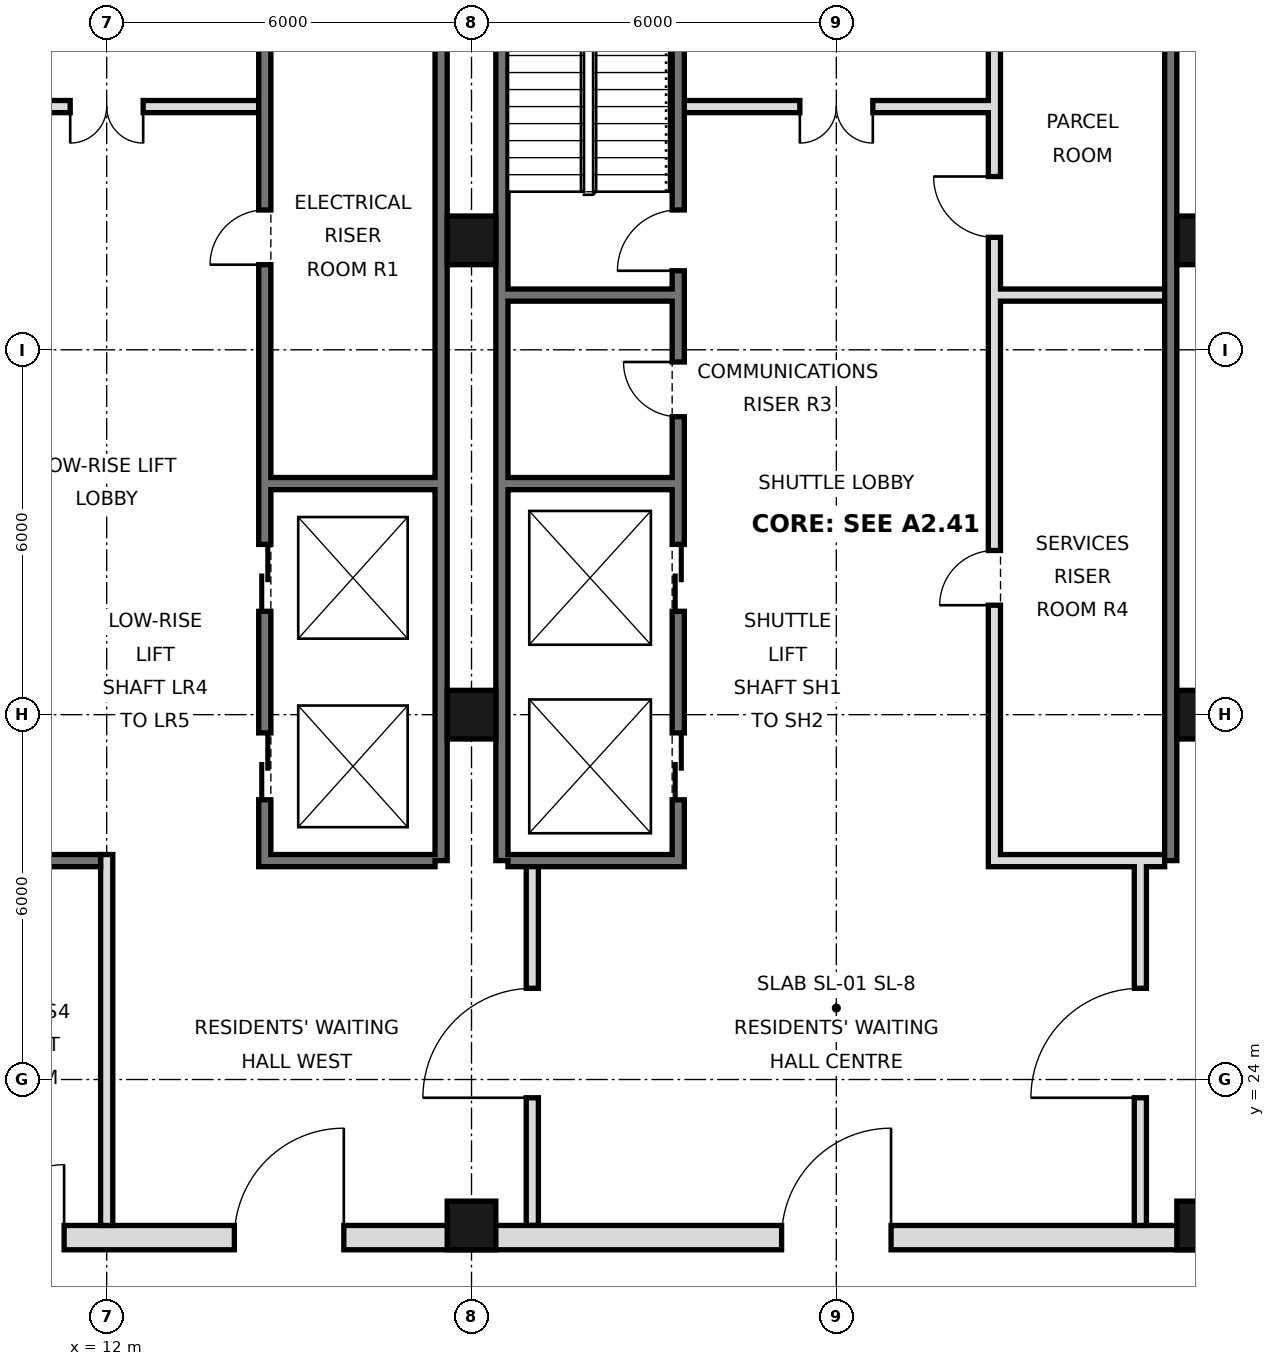
"""IFC4 building model, lengths in metres.
Left out: names, types, materials, properties, quantities, classifications, styles, units other than length and angle.
Written with IfcOpenShell. Run it as: python <this file> out.ifc"""

import sys

from ifc_helpers import new_model, si_unit, direction, frame, frame_2d, origin, origin_2d, place, context, subcontext, project, spatial, rectangle, hollow_rectangle, extrude, element, fill, save


model = new_model("IFC4")
c1 = context("Model", 3, precision=1e-05, world=origin(), true_north=direction((0.0, 1.0)))
c2 = subcontext(c1, "Body", "Model", "MODEL_VIEW")
j1 = project(units=[si_unit("LENGTHUNIT", "METRE"), si_unit("PLANEANGLEUNIT", "RADIAN")], contexts=[c1])
p1 = place(None, origin())
s1 = spatial("IfcSite", under=j1, at=p1, CompositionType="ELEMENT")
p2 = place(p1, origin())
s2 = spatial("IfcBuilding", under=s1, at=p2, CompositionType="ELEMENT")
p3 = place(p2, frame((0.0, 0.0, 161.8)))
s3 = spatial("IfcBuildingStorey", under=s2, at=p3, CompositionType="ELEMENT", Elevation=161.8)
for number, where, z_axis, x_axis in (
    (1, (18.0, 21.6, 0.0), (0.0, 0.0, 1.0), (1.0, 0.0, 0.0)),
    (2, (18.0, 30.0, 0.0), (0.0, 0.0, 1.0), (1.0, 0.0, 0.0)),
    (3, (18.0, 37.8, 0.0), (0.0, 0.0, 1.0), (1.0, 0.0, 0.0)),
    (4, (30.0, 21.6, 0.0), (0.0, 0.0, 1.0), (1.0, 0.0, 0.0)),
    (5, (30.0, 30.0, 0.0), (0.0, 0.0, 1.0), (1.0, 0.0, 0.0)),
    (6, (30.0, 37.8, 0.0), (0.0, 0.0, 1.0), (1.0, 0.0, 0.0)),
):
    element("IfcColumn", number, at=place(p3, frame(where, z_axis=z_axis, x_axis=x_axis)), inside=s3, PredefinedType="COLUMN", context=c2, shape_type="SweptSolid", body=[
        extrude(hollow_rectangle(XDim=0.8, YDim=0.8, WallThickness=0.045, at=origin_2d()), origin(), (0.0, 0.0, 1.0), 5.4),
    ])
for number, where, z_axis, x_axis in (
    (7, (17.5, 27.6, 0.0), (0.0, 0.0, 1.0), (0.0, 1.0, 0.0)),
    (8, (18.5, 27.6, 0.0), (0.0, 0.0, 1.0), (0.0, 1.0, 0.0)),
    (9, (29.5, 27.6, 0.0), (0.0, 0.0, 1.0), (0.0, 1.0, 0.0)),
):
    element("IfcWall", number, at=place(p3, frame(where, z_axis=z_axis, x_axis=x_axis)), inside=s3, PredefinedType="SOLIDWALL", context=c2, shape_type="SweptSolid", body=[
        extrude(rectangle(XDim=17.5, YDim=0.2, at=frame_2d((8.75, 0.0))), origin(), (0.0, 0.0, 1.0), 5.22),
    ])
p4 = place(p3, frame((5.6, 21.4, 0.0), z_axis=(0.0, 0.0, 1.0), x_axis=(1.0, 0.0, 0.0)))
e10 = element("IfcWall", 10, at=p4, inside=s3, PredefinedType="SOLIDWALL", context=c2, shape_type="SweptSolid", body=[
    extrude(rectangle(XDim=36.8, YDim=0.4, at=frame_2d((18.4, 0.0))), origin(), (0.0, 0.0, 1.0), 5.22),
])
p5 = place(p4, frame((8.5, 0.0, 0.0)))
e11 = element("IfcOpeningElement", 11, at=p5, cuts=e10, PredefinedType="OPENING", context=c2, shape_type="SweptSolid", body=[
    extrude(rectangle(XDim=1.8, YDim=2.1, at=frame_2d((0.9, 1.05))), frame((0.0, 0.21, 0.0), z_axis=(0.0, -1.0, 0.0), x_axis=(1.0, 0.0, 0.0)), (0.0, 0.0, 1.0), 0.42),
])
p6 = place(p4, frame((17.5, 0.0, 0.0)))
e12 = element("IfcOpeningElement", 12, at=p6, cuts=e10, PredefinedType="OPENING", context=c2, shape_type="SweptSolid", body=[
    extrude(rectangle(XDim=1.8, YDim=2.1, at=frame_2d((0.9, 1.05))), frame((0.0, 0.21, 0.0), z_axis=(0.0, -1.0, 0.0), x_axis=(1.0, 0.0, 0.0)), (0.0, 0.0, 1.0), 0.42),
])
p7 = place(p4, frame((26.5, 0.0, 0.0)))
e13 = element("IfcOpeningElement", 13, at=p7, cuts=e10, PredefinedType="OPENING", context=c2, shape_type="SweptSolid", body=[
    extrude(rectangle(XDim=1.8, YDim=2.1, at=frame_2d((0.9, 1.05))), frame((0.0, 0.21, 0.0), z_axis=(0.0, -1.0, 0.0), x_axis=(1.0, 0.0, 0.0)), (0.0, 0.0, 1.0), 0.42),
])
p8 = place(p4, frame((4.5, 0.0, 0.0)))
e14 = element("IfcOpeningElement", 14, at=p8, cuts=e10, PredefinedType="OPENING", context=c2, shape_type="SweptSolid", body=[
    extrude(rectangle(XDim=1.2, YDim=2.1, at=frame_2d((0.6, 1.05))), frame((0.0, 0.21, 0.0), z_axis=(0.0, -1.0, 0.0), x_axis=(1.0, 0.0, 0.0)), (0.0, 0.0, 1.0), 0.42),
])
p9 = place(p4, frame((31.1, 0.0, 0.0)))
e15 = element("IfcOpeningElement", 15, at=p9, cuts=e10, PredefinedType="OPENING", context=c2, shape_type="SweptSolid", body=[
    extrude(rectangle(XDim=1.2, YDim=2.1, at=frame_2d((0.6, 1.05))), frame((0.0, 0.21, 0.0), z_axis=(0.0, -1.0, 0.0), x_axis=(1.0, 0.0, 0.0)), (0.0, 0.0, 1.0), 0.42),
])
p10 = place(p3, frame((19.0, 21.6, 0.0), z_axis=(0.0, 0.0, 1.0), x_axis=(0.0, 1.0, 0.0)))
e16 = element("IfcWall", 16, at=p10, inside=s3, PredefinedType="PARTITIONING", context=c2, shape_type="SweptSolid", body=[
    extrude(rectangle(XDim=6.0, YDim=0.2, at=frame_2d((3.0, 0.0))), origin(), (0.0, 0.0, 1.0), 5.22),
])
p11 = place(p10, frame((2.1, 0.0, 0.0)))
e17 = element("IfcOpeningElement", 17, at=p11, cuts=e16, PredefinedType="OPENING", context=c2, shape_type="SweptSolid", body=[
    extrude(rectangle(XDim=1.8, YDim=2.1, at=frame_2d((0.9, 1.05))), frame((0.0, 0.11, 0.0), z_axis=(0.0, -1.0, 0.0), x_axis=(1.0, 0.0, 0.0)), (0.0, 0.0, 1.0), 0.22),
])
p12 = place(p3, frame((29.0, 21.6, 0.0), z_axis=(0.0, 0.0, 1.0), x_axis=(0.0, 1.0, 0.0)))
e18 = element("IfcWall", 18, at=p12, inside=s3, PredefinedType="PARTITIONING", context=c2, shape_type="SweptSolid", body=[
    extrude(rectangle(XDim=6.0, YDim=0.2, at=frame_2d((3.0, 0.0))), origin(), (0.0, 0.0, 1.0), 5.22),
])
p13 = place(p12, frame((2.1, 0.0, 0.0)))
e19 = element("IfcOpeningElement", 19, at=p13, cuts=e18, PredefinedType="OPENING", context=c2, shape_type="SweptSolid", body=[
    extrude(rectangle(XDim=1.8, YDim=2.1, at=frame_2d((0.9, 1.05))), frame((0.0, 0.11, 0.0), z_axis=(0.0, -1.0, 0.0), x_axis=(1.0, 0.0, 0.0)), (0.0, 0.0, 1.0), 0.22),
])
p14 = place(p3, frame((12.0, 21.6, 0.0), z_axis=(0.0, 0.0, 1.0), x_axis=(0.0, 1.0, 0.0)))
e20 = element("IfcWall", 20, at=p14, inside=s3, PredefinedType="PARTITIONING", context=c2, shape_type="SweptSolid", body=[
    extrude(rectangle(XDim=6.1, YDim=0.2, at=frame_2d((3.05, 0.0))), origin(), (0.0, 0.0, 1.0), 5.22),
])
p15 = place(p3, frame((14.6, 27.5, 0.0), z_axis=(0.0, 0.0, 1.0), x_axis=(0.0, 1.0, 0.0)))
e21 = element("IfcWall", 21, at=p15, inside=s3, PredefinedType="SOLIDWALL", context=c2, shape_type="SweptSolid", body=[
    extrude(rectangle(XDim=17.5, YDim=0.2, at=frame_2d((8.75, 0.0))), origin(), (0.0, 0.0, 1.0), 5.22),
])
p16 = place(p15, frame((1.1, 0.0, 0.0)))
e22 = element("IfcOpeningElement", 22, at=p16, cuts=e21, PredefinedType="OPENING", context=c2, shape_type="SweptSolid", body=[
    extrude(rectangle(XDim=1.1, YDim=2.1, at=frame_2d((0.55, 1.05))), frame((0.0, 0.11, 0.0), z_axis=(0.0, -1.0, 0.0), x_axis=(1.0, 0.0, 0.0)), (0.0, 0.0, 1.0), 0.22),
])
p17 = place(p15, frame((4.2, 0.0, 0.0)))
e23 = element("IfcOpeningElement", 23, at=p17, cuts=e21, PredefinedType="OPENING", context=c2, shape_type="SweptSolid", body=[
    extrude(rectangle(XDim=1.1, YDim=2.1, at=frame_2d((0.55, 1.05))), frame((0.0, 0.11, 0.0), z_axis=(0.0, -1.0, 0.0), x_axis=(1.0, 0.0, 0.0)), (0.0, 0.0, 1.0), 0.22),
])
p18 = place(p15, frame((15.4, 0.0, 0.0)))
e24 = element("IfcOpeningElement", 24, at=p18, cuts=e21, PredefinedType="OPENING", context=c2, shape_type="SweptSolid", body=[
    extrude(rectangle(XDim=1.1, YDim=2.1, at=frame_2d((0.55, 1.05))), frame((0.0, 0.11, 0.0), z_axis=(0.0, -1.0, 0.0), x_axis=(1.0, 0.0, 0.0)), (0.0, 0.0, 1.0), 0.22),
])
p19 = place(p15, frame((9.9, 0.0, 0.0)))
e25 = element("IfcOpeningElement", 25, at=p19, cuts=e21, PredefinedType="OPENING", context=c2, shape_type="SweptSolid", body=[
    extrude(rectangle(XDim=0.9, YDim=2.1, at=frame_2d((0.45, 1.05))), frame((0.0, 0.11, 0.0), z_axis=(0.0, -1.0, 0.0), x_axis=(1.0, 0.0, 0.0)), (0.0, 0.0, 1.0), 0.22),
])
p20 = place(p3, frame((21.4, 27.5, 0.0), z_axis=(0.0, 0.0, 1.0), x_axis=(0.0, 1.0, 0.0)))
e26 = element("IfcWall", 26, at=p20, inside=s3, PredefinedType="SOLIDWALL", context=c2, shape_type="SweptSolid", body=[
    extrude(rectangle(XDim=17.5, YDim=0.2, at=frame_2d((8.75, 0.0))), origin(), (0.0, 0.0, 1.0), 5.22),
])
p21 = place(p20, frame((1.1, 0.0, 0.0)))
e27 = element("IfcOpeningElement", 27, at=p21, cuts=e26, PredefinedType="OPENING", context=c2, shape_type="SweptSolid", body=[
    extrude(rectangle(XDim=1.1, YDim=2.1, at=frame_2d((0.55, 1.05))), frame((0.0, 0.11, 0.0), z_axis=(0.0, -1.0, 0.0), x_axis=(1.0, 0.0, 0.0)), (0.0, 0.0, 1.0), 0.22),
])
p22 = place(p20, frame((4.2, 0.0, 0.0)))
e28 = element("IfcOpeningElement", 28, at=p22, cuts=e26, PredefinedType="OPENING", context=c2, shape_type="SweptSolid", body=[
    extrude(rectangle(XDim=1.1, YDim=2.1, at=frame_2d((0.55, 1.05))), frame((0.0, 0.11, 0.0), z_axis=(0.0, -1.0, 0.0), x_axis=(1.0, 0.0, 0.0)), (0.0, 0.0, 1.0), 0.22),
])
p23 = place(p20, frame((9.8, 0.0, 0.0)))
e29 = element("IfcOpeningElement", 29, at=p23, cuts=e26, PredefinedType="OPENING", context=c2, shape_type="SweptSolid", body=[
    extrude(rectangle(XDim=1.0, YDim=2.1, at=frame_2d((0.5, 1.05))), frame((0.0, 0.11, 0.0), z_axis=(0.0, -1.0, 0.0), x_axis=(1.0, 0.0, 0.0)), (0.0, 0.0, 1.0), 0.22),
])
p24 = place(p20, frame((7.4, 0.0, 0.0)))
e30 = element("IfcOpeningElement", 30, at=p24, cuts=e26, PredefinedType="OPENING", context=c2, shape_type="SweptSolid", body=[
    extrude(rectangle(XDim=0.9, YDim=2.1, at=frame_2d((0.45, 1.05))), frame((0.0, 0.11, 0.0), z_axis=(0.0, -1.0, 0.0), x_axis=(1.0, 0.0, 0.0)), (0.0, 0.0, 1.0), 0.22),
])
p25 = place(p3, frame((26.6, 27.5, 0.0), z_axis=(0.0, 0.0, 1.0), x_axis=(0.0, 1.0, 0.0)))
e31 = element("IfcWall", 31, at=p25, inside=s3, PredefinedType="SOLIDWALL", context=c2, shape_type="SweptSolid", body=[
    extrude(rectangle(XDim=17.5, YDim=0.2, at=frame_2d((8.75, 0.0))), origin(), (0.0, 0.0, 1.0), 5.22),
])
p26 = place(p25, frame((4.3, 0.0, 0.0)))
e32 = element("IfcOpeningElement", 32, at=p26, cuts=e31, PredefinedType="OPENING", context=c2, shape_type="SweptSolid", body=[
    extrude(rectangle(XDim=0.9, YDim=2.1, at=frame_2d((0.45, 1.05))), frame((0.0, 0.11, 0.0), z_axis=(0.0, -1.0, 0.0), x_axis=(1.0, 0.0, 0.0)), (0.0, 0.0, 1.0), 0.22),
])
p27 = place(p25, frame((10.35, 0.0, 0.0)))
e33 = element("IfcOpeningElement", 33, at=p27, cuts=e31, PredefinedType="OPENING", context=c2, shape_type="SweptSolid", body=[
    extrude(rectangle(XDim=1.0, YDim=2.1, at=frame_2d((0.5, 1.05))), frame((0.0, 0.11, 0.0), z_axis=(0.0, -1.0, 0.0), x_axis=(1.0, 0.0, 0.0)), (0.0, 0.0, 1.0), 0.22),
])
p28 = place(p25, frame((15.475, 0.0, 0.0)))
e34 = element("IfcOpeningElement", 34, at=p28, cuts=e31, PredefinedType="OPENING", context=c2, shape_type="SweptSolid", body=[
    extrude(rectangle(XDim=1.0, YDim=2.1, at=frame_2d((0.5, 1.05))), frame((0.0, 0.11, 0.0), z_axis=(0.0, -1.0, 0.0), x_axis=(1.0, 0.0, 0.0)), (0.0, 0.0, 1.0), 0.22),
])
for number, where, z_axis, x_axis in (
    (35, (14.7, 27.6, 0.0), (0.0, 0.0, 1.0), (1.0, 0.0, 0.0)),
    (36, (18.6, 27.6, 0.0), (0.0, 0.0, 1.0), (1.0, 0.0, 0.0)),
    (37, (26.7, 27.6, 0.0), (0.0, 0.0, 1.0), (1.0, 0.0, 0.0)),
):
    element("IfcWall", number, at=place(p3, frame(where, z_axis=z_axis, x_axis=x_axis)), inside=s3, PredefinedType="SOLIDWALL", context=c2, shape_type="SweptSolid", body=[
        extrude(rectangle(XDim=2.7, YDim=0.2, at=frame_2d((1.35, 0.0))), origin(), (0.0, 0.0, 1.0), 5.22),
    ])
p29 = place(p3, frame((6.6, 27.6, 0.0), z_axis=(0.0, 0.0, 1.0), x_axis=(1.0, 0.0, 0.0)))
e38 = element("IfcWall", 38, at=p29, inside=s3, PredefinedType="SOLIDWALL", context=c2, shape_type="SweptSolid", body=[
    extrude(rectangle(XDim=5.3, YDim=0.2, at=frame_2d((2.65, 0.0))), origin(), (0.0, 0.0, 1.0), 5.22),
])
for number, where, z_axis, x_axis in (
    (39, (14.7, 33.8, 0.0), (0.0, 0.0, 1.0), (1.0, 0.0, 0.0)),
    (40, (18.6, 33.8, 0.0), (0.0, 0.0, 1.0), (1.0, 0.0, 0.0)),
    (41, (18.6, 36.9, 0.0), (0.0, 0.0, 1.0), (1.0, 0.0, 0.0)),
    (42, (26.7, 36.9, 0.0), (0.0, 0.0, 1.0), (1.0, 0.0, 0.0)),
):
    element("IfcWall", number, at=place(p3, frame(where, z_axis=z_axis, x_axis=x_axis)), inside=s3, PredefinedType="SOLIDWALL", context=c2, shape_type="SweptSolid", body=[
        extrude(rectangle(XDim=2.7, YDim=0.2, at=frame_2d((1.35, 0.0))), origin(), (0.0, 0.0, 1.0), 5.22),
    ])
p30 = place(p3, frame((21.5, 40.0, 0.0), z_axis=(0.0, 0.0, 1.0), x_axis=(1.0, 0.0, 0.0)))
e43 = element("IfcWall", 43, at=p30, inside=s3, PredefinedType="PARTITIONING", context=c2, shape_type="SweptSolid", body=[
    extrude(rectangle(XDim=5.0, YDim=0.2, at=frame_2d((2.5, 0.0))), origin(), (0.0, 0.0, 1.0), 5.22),
])
p31 = place(p30, frame((1.9, 0.0, 0.0)))
e44 = element("IfcOpeningElement", 44, at=p31, cuts=e43, PredefinedType="OPENING", context=c2, shape_type="SweptSolid", body=[
    extrude(rectangle(XDim=1.2, YDim=2.1, at=frame_2d((0.6, 1.05))), frame((0.0, 0.11, 0.0), z_axis=(0.0, -1.0, 0.0), x_axis=(1.0, 0.0, 0.0)), (0.0, 0.0, 1.0), 0.22),
])
p32 = place(p3, frame((9.5, 40.0, 0.0), z_axis=(0.0, 0.0, 1.0), x_axis=(1.0, 0.0, 0.0)))
e45 = element("IfcWall", 45, at=p32, inside=s3, PredefinedType="PARTITIONING", context=c2, shape_type="SweptSolid", body=[
    extrude(rectangle(XDim=5.0, YDim=0.2, at=frame_2d((2.5, 0.0))), origin(), (0.0, 0.0, 1.0), 5.22),
])
p33 = place(p32, frame((1.9, 0.0, 0.0)))
e46 = element("IfcOpeningElement", 46, at=p33, cuts=e45, PredefinedType="OPENING", context=c2, shape_type="SweptSolid", body=[
    extrude(rectangle(XDim=1.2, YDim=2.1, at=frame_2d((0.6, 1.05))), frame((0.0, 0.11, 0.0), z_axis=(0.0, -1.0, 0.0), x_axis=(1.0, 0.0, 0.0)), (0.0, 0.0, 1.0), 0.22),
])
p34 = place(p5, frame((1.8, 0.0, 0.0), z_axis=(0.0, 0.0, 1.0), x_axis=(-1.0, 0.0, 0.0)))
e47 = element("IfcDoor", 47, at=p34, inside=s3, OperationType="SINGLE_SWING_LEFT", PredefinedType="DOOR", context=c2, shape_type="SweptSolid", body=[
    extrude(rectangle(XDim=1.8, YDim=2.1, at=frame_2d((0.9, 1.05))), frame((0.0, 0.025, 0.0), z_axis=(0.0, -1.0, 0.0), x_axis=(1.0, 0.0, 0.0)), (0.0, 0.0, 1.0), 0.05),
])
fill(e11, e47)
p35 = place(p11, origin())
e48 = element("IfcDoor", 48, at=p35, inside=s3, OperationType="SINGLE_SWING_LEFT", PredefinedType="DOOR", context=c2, shape_type="SweptSolid", body=[
    extrude(rectangle(XDim=1.8, YDim=2.1, at=frame_2d((0.9, 1.05))), frame((0.0, 0.025, 0.0), z_axis=(0.0, -1.0, 0.0), x_axis=(1.0, 0.0, 0.0)), (0.0, 0.0, 1.0), 0.05),
])
fill(e17, e48)
p36 = place(p6, frame((1.8, 0.0, 0.0), z_axis=(0.0, 0.0, 1.0), x_axis=(-1.0, 0.0, 0.0)))
e49 = element("IfcDoor", 49, at=p36, inside=s3, OperationType="SINGLE_SWING_LEFT", PredefinedType="DOOR", context=c2, shape_type="SweptSolid", body=[
    extrude(rectangle(XDim=1.8, YDim=2.1, at=frame_2d((0.9, 1.05))), frame((0.0, 0.025, 0.0), z_axis=(0.0, -1.0, 0.0), x_axis=(1.0, 0.0, 0.0)), (0.0, 0.0, 1.0), 0.05),
])
fill(e12, e49)
p37 = place(p13, origin())
e50 = element("IfcDoor", 50, at=p37, inside=s3, OperationType="SINGLE_SWING_LEFT", PredefinedType="DOOR", context=c2, shape_type="SweptSolid", body=[
    extrude(rectangle(XDim=1.8, YDim=2.1, at=frame_2d((0.9, 1.05))), frame((0.0, 0.025, 0.0), z_axis=(0.0, -1.0, 0.0), x_axis=(1.0, 0.0, 0.0)), (0.0, 0.0, 1.0), 0.05),
])
fill(e19, e50)
p38 = place(p8, frame((1.2, 0.0, 0.0), z_axis=(0.0, 0.0, 1.0), x_axis=(-1.0, 0.0, 0.0)))
e51 = element("IfcDoor", 51, at=p38, inside=s3, OperationType="SINGLE_SWING_LEFT", PredefinedType="DOOR", context=c2, shape_type="SweptSolid", body=[
    extrude(rectangle(XDim=1.2, YDim=2.1, at=frame_2d((0.6, 1.05))), frame((0.0, 0.025, 0.0), z_axis=(0.0, -1.0, 0.0), x_axis=(1.0, 0.0, 0.0)), (0.0, 0.0, 1.0), 0.05),
])
fill(e14, e51)
p39 = place(p33, frame((1.2, 0.0, 0.0), z_axis=(0.0, 0.0, 1.0), x_axis=(-1.0, 0.0, 0.0)))
e52 = element("IfcDoor", 52, at=p39, inside=s3, OperationType="DOUBLE_DOOR_SINGLE_SWING", PredefinedType="DOOR", context=c2, shape_type="SweptSolid", body=[
    extrude(rectangle(XDim=1.2, YDim=2.1, at=frame_2d((0.6, 1.05))), frame((0.0, 0.025, 0.0), z_axis=(0.0, -1.0, 0.0), x_axis=(1.0, 0.0, 0.0)), (0.0, 0.0, 1.0), 0.05),
])
fill(e46, e52)
p40 = place(p31, frame((1.2, 0.0, 0.0), z_axis=(0.0, 0.0, 1.0), x_axis=(-1.0, 0.0, 0.0)))
e53 = element("IfcDoor", 53, at=p40, inside=s3, OperationType="DOUBLE_DOOR_SINGLE_SWING", PredefinedType="DOOR", context=c2, shape_type="SweptSolid", body=[
    extrude(rectangle(XDim=1.2, YDim=2.1, at=frame_2d((0.6, 1.05))), frame((0.0, 0.025, 0.0), z_axis=(0.0, -1.0, 0.0), x_axis=(1.0, 0.0, 0.0)), (0.0, 0.0, 1.0), 0.05),
])
fill(e44, e53)
p41 = place(p21, origin())
e54 = element("IfcDoor", 54, at=p41, inside=s3, OperationType="DOUBLE_DOOR_SLIDING", PredefinedType="DOOR", context=c2, shape_type="SweptSolid", body=[
    extrude(rectangle(XDim=1.1, YDim=2.1, at=frame_2d((0.55, 1.05))), frame((0.0, 0.025, 0.0), z_axis=(0.0, -1.0, 0.0), x_axis=(1.0, 0.0, 0.0)), (0.0, 0.0, 1.0), 0.05),
])
fill(e27, e54)
p42 = place(p22, origin())
e55 = element("IfcDoor", 55, at=p42, inside=s3, OperationType="DOUBLE_DOOR_SLIDING", PredefinedType="DOOR", context=c2, shape_type="SweptSolid", body=[
    extrude(rectangle(XDim=1.1, YDim=2.1, at=frame_2d((0.55, 1.05))), frame((0.0, 0.025, 0.0), z_axis=(0.0, -1.0, 0.0), x_axis=(1.0, 0.0, 0.0)), (0.0, 0.0, 1.0), 0.05),
])
fill(e28, e55)
p43 = place(p16, origin())
e56 = element("IfcDoor", 56, at=p43, inside=s3, OperationType="DOUBLE_DOOR_SLIDING", PredefinedType="DOOR", context=c2, shape_type="SweptSolid", body=[
    extrude(rectangle(XDim=1.1, YDim=2.1, at=frame_2d((0.55, 1.05))), frame((0.0, 0.025, 0.0), z_axis=(0.0, -1.0, 0.0), x_axis=(1.0, 0.0, 0.0)), (0.0, 0.0, 1.0), 0.05),
])
fill(e22, e56)
p44 = place(p17, origin())
e57 = element("IfcDoor", 57, at=p44, inside=s3, OperationType="DOUBLE_DOOR_SLIDING", PredefinedType="DOOR", context=c2, shape_type="SweptSolid", body=[
    extrude(rectangle(XDim=1.1, YDim=2.1, at=frame_2d((0.55, 1.05))), frame((0.0, 0.025, 0.0), z_axis=(0.0, -1.0, 0.0), x_axis=(1.0, 0.0, 0.0)), (0.0, 0.0, 1.0), 0.05),
])
fill(e23, e57)
p45 = place(p23, origin())
e58 = element("IfcDoor", 58, at=p45, inside=s3, OperationType="SINGLE_SWING_LEFT", PredefinedType="DOOR", context=c2, shape_type="SweptSolid", body=[
    extrude(rectangle(XDim=1.0, YDim=2.1, at=frame_2d((0.5, 1.05))), frame((0.0, 0.025, 0.0), z_axis=(0.0, -1.0, 0.0), x_axis=(1.0, 0.0, 0.0)), (0.0, 0.0, 1.0), 0.05),
])
fill(e29, e58)
p46 = place(p19, origin())
e59 = element("IfcDoor", 59, at=p46, inside=s3, OperationType="SINGLE_SWING_LEFT", PredefinedType="DOOR", context=c2, shape_type="SweptSolid", body=[
    extrude(rectangle(XDim=0.9, YDim=2.1, at=frame_2d((0.45, 1.05))), frame((0.0, 0.025, 0.0), z_axis=(0.0, -1.0, 0.0), x_axis=(1.0, 0.0, 0.0)), (0.0, 0.0, 1.0), 0.05),
])
fill(e25, e59)
p47 = place(p24, frame((0.9, 0.0, 0.0), z_axis=(0.0, 0.0, 1.0), x_axis=(-1.0, 0.0, 0.0)))
e60 = element("IfcDoor", 60, at=p47, inside=s3, OperationType="SINGLE_SWING_LEFT", PredefinedType="DOOR", context=c2, shape_type="SweptSolid", body=[
    extrude(rectangle(XDim=0.9, YDim=2.1, at=frame_2d((0.45, 1.05))), frame((0.0, 0.025, 0.0), z_axis=(0.0, -1.0, 0.0), x_axis=(1.0, 0.0, 0.0)), (0.0, 0.0, 1.0), 0.05),
])
fill(e30, e60)
p48 = place(p26, origin())
e61 = element("IfcDoor", 61, at=p48, inside=s3, OperationType="SINGLE_SWING_LEFT", PredefinedType="DOOR", context=c2, shape_type="SweptSolid", body=[
    extrude(rectangle(XDim=0.9, YDim=2.1, at=frame_2d((0.45, 1.05))), frame((0.0, 0.025, 0.0), z_axis=(0.0, -1.0, 0.0), x_axis=(1.0, 0.0, 0.0)), (0.0, 0.0, 1.0), 0.05),
])
fill(e32, e61)
p49 = place(p27, frame((1.0, 0.0, 0.0), z_axis=(0.0, 0.0, 1.0), x_axis=(-1.0, 0.0, 0.0)))
e62 = element("IfcDoor", 62, at=p49, inside=s3, OperationType="SINGLE_SWING_LEFT", PredefinedType="DOOR", context=c2, shape_type="SweptSolid", body=[
    extrude(rectangle(XDim=1.0, YDim=2.1, at=frame_2d((0.5, 1.05))), frame((0.0, 0.025, 0.0), z_axis=(0.0, -1.0, 0.0), x_axis=(1.0, 0.0, 0.0)), (0.0, 0.0, 1.0), 0.05),
])
fill(e33, e62)
save(model, sys.argv[1])
